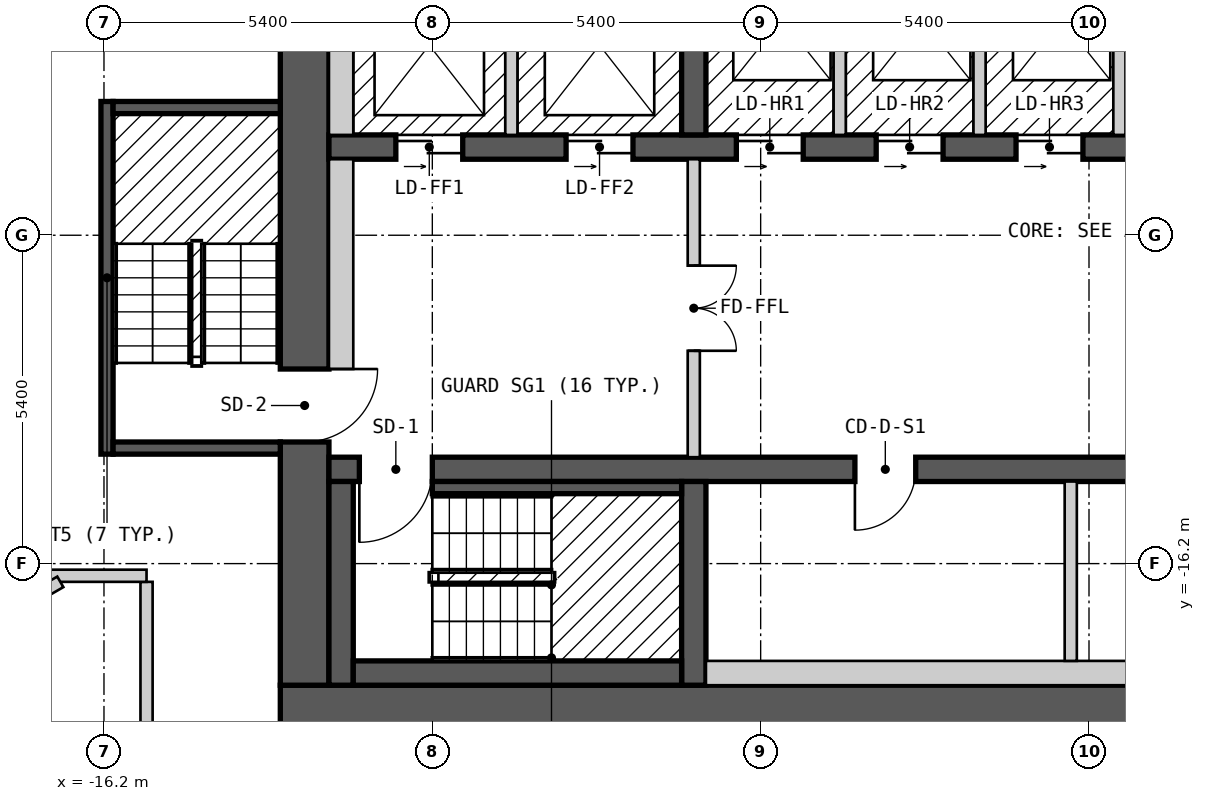
"""IFC4 building model, lengths in metres.
Left out: names, types, materials, properties, quantities, classifications, styles, units other than length and angle.
Written with IfcOpenShell. Run it as: python <this file> out.ifc"""

import sys

from ifc_helpers import new_model, si_unit, direction, frame, frame_2d, origin, place, context, subcontext, project, spatial, polyline, rectangle, outline, extrude, element, fill, save


model = new_model("IFC4")
c1 = context("Model", 3, precision=1e-05, world=origin(), true_north=direction((0.0, 1.0)))
c2 = subcontext(c1, "Body", "Model", "MODEL_VIEW")
j1 = project(units=[si_unit("LENGTHUNIT", "METRE"), si_unit("PLANEANGLEUNIT", "RADIAN")], contexts=[c1])
p1 = place(None, origin())
s1 = spatial("IfcSite", under=j1, at=p1, CompositionType="ELEMENT")
p2 = place(p1, origin())
s2 = spatial("IfcBuilding", under=s1, at=p2, CompositionType="ELEMENT")
p3 = place(p2, frame((0.0, 0.0, 150.6)))
s3 = spatial("IfcBuildingStorey", under=s2, at=p3, CompositionType="ELEMENT", Elevation=150.6)
p4 = place(p3, frame((-13.3, -18.6, 0.0), z_axis=(0.0, 0.0, 1.0), x_axis=(1.0, 0.0, 0.0)))
e1 = element("IfcWall", 1, at=p4, inside=s3, PredefinedType="SHEAR", context=c2, shape_type="SweptSolid", body=[
    extrude(rectangle(XDim=26.6, YDim=0.8, at=frame_2d((13.3, 0.0))), origin(), (0.0, 0.0, 1.0), 2.6),
])
p5 = place(p3, frame((-12.9, -18.2, 0.0), z_axis=(0.0, 0.0, 1.0), x_axis=(0.0, 1.0, 0.0)))
e2 = element("IfcWall", 2, at=p5, inside=s3, PredefinedType="SHEAR", context=c2, shape_type="SweptSolid", body=[
    extrude(rectangle(XDim=12.4, YDim=0.8, at=frame_2d((6.2, 0.0))), origin(), (0.0, 0.0, 1.0), 2.6),
])
p6 = place(p5, frame((4.0, 0.0, 0.0)))
e3 = element("IfcOpeningElement", 3, at=p6, cuts=e2, PredefinedType="OPENING", context=c2, shape_type="SweptSolid", body=[
    extrude(rectangle(XDim=1.2, YDim=2.1, at=frame_2d((0.6, 1.05))), frame((0.0, 0.41, 0.0), z_axis=(0.0, -1.0, 0.0), x_axis=(1.0, 0.0, 0.0)), (0.0, 0.0, 1.0), 0.82),
])
p7 = place(p3, frame((-12.5, -14.65, 0.0), z_axis=(0.0, 0.0, 1.0), x_axis=(1.0, 0.0, 0.0)))
e4 = element("IfcWall", 4, at=p7, inside=s3, PredefinedType="SHEAR", context=c2, shape_type="SweptSolid", body=[
    extrude(rectangle(XDim=25.0, YDim=0.4, at=frame_2d((12.5, 0.0))), origin(), (0.0, 0.0, 1.0), 2.6),
])
p8 = place(p7, frame((1.7, 0.0, 0.0), z_axis=(0.0, 0.0, 1.0), x_axis=(-1.0, 0.0, 0.0)))
e5 = element("IfcOpeningElement", 5, at=p8, cuts=e4, PredefinedType="OPENING", context=c2, shape_type="SweptSolid", body=[
    extrude(rectangle(XDim=1.2, YDim=2.1, at=frame_2d((0.6, 1.05))), frame((0.0, 0.21, 0.0), z_axis=(0.0, -1.0, 0.0), x_axis=(1.0, 0.0, 0.0)), (0.0, 0.0, 1.0), 0.42),
])
p9 = place(p7, frame((24.55, 0.0, 0.0), z_axis=(0.0, 0.0, 1.0), x_axis=(-1.0, 0.0, 0.0)))
e6 = element("IfcOpeningElement", 6, at=p9, cuts=e4, PredefinedType="OPENING", context=c2, shape_type="SweptSolid", body=[
    extrude(rectangle(XDim=1.2, YDim=2.1, at=frame_2d((0.6, 1.05))), frame((0.0, 0.21, 0.0), z_axis=(0.0, -1.0, 0.0), x_axis=(1.0, 0.0, 0.0)), (0.0, 0.0, 1.0), 0.42),
])
p10 = place(p7, frame((9.65, 0.0, 0.0), z_axis=(0.0, 0.0, 1.0), x_axis=(-1.0, 0.0, 0.0)))
e7 = element("IfcOpeningElement", 7, at=p10, cuts=e4, PredefinedType="OPENING", context=c2, shape_type="SweptSolid", body=[
    extrude(rectangle(XDim=1.0, YDim=2.1, at=frame_2d((0.5, 1.05))), frame((0.0, 0.21, 0.0), z_axis=(0.0, -1.0, 0.0), x_axis=(1.0, 0.0, 0.0)), (0.0, 0.0, 1.0), 0.42),
])
p11 = place(p7, frame((16.05, 0.0, 0.0), z_axis=(0.0, 0.0, 1.0), x_axis=(-1.0, 0.0, 0.0)))
e8 = element("IfcOpeningElement", 8, at=p11, cuts=e4, PredefinedType="OPENING", context=c2, shape_type="SweptSolid", body=[
    extrude(rectangle(XDim=1.0, YDim=2.1, at=frame_2d((0.5, 1.05))), frame((0.0, 0.21, 0.0), z_axis=(0.0, -1.0, 0.0), x_axis=(1.0, 0.0, 0.0)), (0.0, 0.0, 1.0), 0.42),
])
p12 = place(p3, frame((-12.5, -9.35, 0.0), z_axis=(0.0, 0.0, 1.0), x_axis=(1.0, 0.0, 0.0)))
e9 = element("IfcWall", 9, at=p12, inside=s3, PredefinedType="SHEAR", context=c2, shape_type="SweptSolid", body=[
    extrude(rectangle(XDim=22.7, YDim=0.4, at=frame_2d((11.35, 0.0))), origin(), (0.0, 0.0, 1.0), 2.6),
])
p13 = place(p12, frame((1.1, 0.0, 0.0)))
e10 = element("IfcOpeningElement", 10, at=p13, cuts=e9, PredefinedType="OPENING", context=c2, shape_type="SweptSolid", body=[
    extrude(rectangle(XDim=1.1, YDim=2.1, at=frame_2d((0.55, 1.05))), frame((0.0, 0.21, 0.0), z_axis=(0.0, -1.0, 0.0), x_axis=(1.0, 0.0, 0.0)), (0.0, 0.0, 1.0), 0.42),
])
p14 = place(p12, frame((3.9, 0.0, 0.0)))
e11 = element("IfcOpeningElement", 11, at=p14, cuts=e9, PredefinedType="OPENING", context=c2, shape_type="SweptSolid", body=[
    extrude(rectangle(XDim=1.1, YDim=2.1, at=frame_2d((0.55, 1.05))), frame((0.0, 0.21, 0.0), z_axis=(0.0, -1.0, 0.0), x_axis=(1.0, 0.0, 0.0)), (0.0, 0.0, 1.0), 0.42),
])
p15 = place(p12, frame((6.7, 0.0, 0.0)))
e12 = element("IfcOpeningElement", 12, at=p15, cuts=e9, PredefinedType="OPENING", context=c2, shape_type="SweptSolid", body=[
    extrude(rectangle(XDim=1.1, YDim=2.1, at=frame_2d((0.55, 1.05))), frame((0.0, 0.21, 0.0), z_axis=(0.0, -1.0, 0.0), x_axis=(1.0, 0.0, 0.0)), (0.0, 0.0, 1.0), 0.42),
])
p16 = place(p12, frame((9.0, 0.0, 0.0)))
e13 = element("IfcOpeningElement", 13, at=p16, cuts=e9, PredefinedType="OPENING", context=c2, shape_type="SweptSolid", body=[
    extrude(rectangle(XDim=1.1, YDim=2.1, at=frame_2d((0.55, 1.05))), frame((0.0, 0.21, 0.0), z_axis=(0.0, -1.0, 0.0), x_axis=(1.0, 0.0, 0.0)), (0.0, 0.0, 1.0), 0.42),
])
p17 = place(p12, frame((11.3, 0.0, 0.0)))
e14 = element("IfcOpeningElement", 14, at=p17, cuts=e9, PredefinedType="OPENING", context=c2, shape_type="SweptSolid", body=[
    extrude(rectangle(XDim=1.1, YDim=2.1, at=frame_2d((0.55, 1.05))), frame((0.0, 0.21, 0.0), z_axis=(0.0, -1.0, 0.0), x_axis=(1.0, 0.0, 0.0)), (0.0, 0.0, 1.0), 0.42),
])
p18 = place(p12, frame((13.6, 0.0, 0.0)))
e15 = element("IfcOpeningElement", 15, at=p18, cuts=e9, PredefinedType="OPENING", context=c2, shape_type="SweptSolid", body=[
    extrude(rectangle(XDim=1.1, YDim=2.1, at=frame_2d((0.55, 1.05))), frame((0.0, 0.21, 0.0), z_axis=(0.0, -1.0, 0.0), x_axis=(1.0, 0.0, 0.0)), (0.0, 0.0, 1.0), 0.42),
])
p19 = place(p12, frame((15.9, 0.0, 0.0)))
e16 = element("IfcOpeningElement", 16, at=p19, cuts=e9, PredefinedType="OPENING", context=c2, shape_type="SweptSolid", body=[
    extrude(rectangle(XDim=1.1, YDim=2.1, at=frame_2d((0.55, 1.05))), frame((0.0, 0.21, 0.0), z_axis=(0.0, -1.0, 0.0), x_axis=(1.0, 0.0, 0.0)), (0.0, 0.0, 1.0), 0.42),
])
p20 = place(p12, frame((18.2, 0.0, 0.0)))
e17 = element("IfcOpeningElement", 17, at=p20, cuts=e9, PredefinedType="OPENING", context=c2, shape_type="SweptSolid", body=[
    extrude(rectangle(XDim=1.1, YDim=2.1, at=frame_2d((0.55, 1.05))), frame((0.0, 0.21, 0.0), z_axis=(0.0, -1.0, 0.0), x_axis=(1.0, 0.0, 0.0)), (0.0, 0.0, 1.0), 0.42),
])
p21 = place(p12, frame((20.6, 0.0, 0.0)))
e18 = element("IfcOpeningElement", 18, at=p21, cuts=e9, PredefinedType="OPENING", context=c2, shape_type="SweptSolid", body=[
    extrude(rectangle(XDim=1.1, YDim=2.1, at=frame_2d((0.55, 1.05))), frame((0.0, 0.21, 0.0), z_axis=(0.0, -1.0, 0.0), x_axis=(1.0, 0.0, 0.0)), (0.0, 0.0, 1.0), 0.42),
])
for number, where, z_axis, x_axis in (
    (19, (-6.5, -18.2, 0.0), (0.0, 0.0, 1.0), (0.0, 1.0, 0.0)),
    (20, (-6.5, -9.15, 0.0), (0.0, 0.0, 1.0), (0.0, 1.0, 0.0)),
):
    element("IfcWall", number, at=place(p3, frame(where, z_axis=z_axis, x_axis=x_axis)), inside=s3, PredefinedType="SHEAR", context=c2, shape_type="SweptSolid", body=[
        extrude(rectangle(XDim=3.35, YDim=0.4, at=frame_2d((1.675, 0.0))), origin(), (0.0, 0.0, 1.0), 2.6),
    ])
p22 = place(p3, frame((-28.218, -2.025, 0.0), z_axis=(0.0, 0.0, 1.0), x_axis=(0.500017503135, -0.866015298109, 0.0)))
e21 = element("IfcWall", 21, at=p22, inside=s3, PredefinedType="SOLIDWALL", context=c2, shape_type="SweptSolid", body=[
    extrude(outline(polyline([(0.0, -0.15), (24.711, -0.15), (24.631, 0.15), (0.08, 0.15), (0.0, -0.15)])), origin(), (0.0, 0.0, 1.0), 2.6),
])
p23 = place(p22, frame((1.4, 0.0, 0.15)))
e22 = element("IfcOpeningElement", 22, at=p23, cuts=e21, PredefinedType="OPENING", context=c2, shape_type="SweptSolid", body=[
    extrude(rectangle(XDim=1.5, YDim=2.1, at=frame_2d((0.75, 1.05))), frame((0.0, 0.16, 0.0), z_axis=(0.0, -1.0, 0.0), x_axis=(1.0, 0.0, 0.0)), (0.0, 0.0, 1.0), 0.32),
])
p24 = place(p22, frame((4.316, 0.0, 0.15)))
e23 = element("IfcOpeningElement", 23, at=p24, cuts=e21, PredefinedType="OPENING", context=c2, shape_type="SweptSolid", body=[
    extrude(rectangle(XDim=1.5, YDim=2.1, at=frame_2d((0.75, 1.05))), frame((0.0, 0.16, 0.0), z_axis=(0.0, -1.0, 0.0), x_axis=(1.0, 0.0, 0.0)), (0.0, 0.0, 1.0), 0.32),
])
p25 = place(p22, frame((7.231, 0.0, 0.15)))
e24 = element("IfcOpeningElement", 24, at=p25, cuts=e21, PredefinedType="OPENING", context=c2, shape_type="SweptSolid", body=[
    extrude(rectangle(XDim=1.5, YDim=2.1, at=frame_2d((0.75, 1.05))), frame((0.0, 0.16, 0.0), z_axis=(0.0, -1.0, 0.0), x_axis=(1.0, 0.0, 0.0)), (0.0, 0.0, 1.0), 0.32),
])
p26 = place(p22, frame((10.147, 0.0, 0.15)))
e25 = element("IfcOpeningElement", 25, at=p26, cuts=e21, PredefinedType="OPENING", context=c2, shape_type="SweptSolid", body=[
    extrude(rectangle(XDim=1.5, YDim=2.1, at=frame_2d((0.75, 1.05))), frame((0.0, 0.16, 0.0), z_axis=(0.0, -1.0, 0.0), x_axis=(1.0, 0.0, 0.0)), (0.0, 0.0, 1.0), 0.32),
])
p27 = place(p22, frame((13.062, 0.0, 0.15)))
e26 = element("IfcOpeningElement", 26, at=p27, cuts=e21, PredefinedType="OPENING", context=c2, shape_type="SweptSolid", body=[
    extrude(rectangle(XDim=1.5, YDim=2.1, at=frame_2d((0.75, 1.05))), frame((0.0, 0.16, 0.0), z_axis=(0.0, -1.0, 0.0), x_axis=(1.0, 0.0, 0.0)), (0.0, 0.0, 1.0), 0.32),
])
p28 = place(p22, frame((15.977, 0.0, 0.15)))
e27 = element("IfcOpeningElement", 27, at=p28, cuts=e21, PredefinedType="OPENING", context=c2, shape_type="SweptSolid", body=[
    extrude(rectangle(XDim=1.5, YDim=2.1, at=frame_2d((0.75, 1.05))), frame((0.0, 0.16, 0.0), z_axis=(0.0, -1.0, 0.0), x_axis=(1.0, 0.0, 0.0)), (0.0, 0.0, 1.0), 0.32),
])
p29 = place(p22, frame((18.893, 0.0, 0.15)))
e28 = element("IfcOpeningElement", 28, at=p29, cuts=e21, PredefinedType="OPENING", context=c2, shape_type="SweptSolid", body=[
    extrude(rectangle(XDim=1.5, YDim=2.1, at=frame_2d((0.75, 1.05))), frame((0.0, 0.16, 0.0), z_axis=(0.0, -1.0, 0.0), x_axis=(1.0, 0.0, 0.0)), (0.0, 0.0, 1.0), 0.32),
])
p30 = place(p22, frame((21.809, 0.0, 0.15)))
e29 = element("IfcOpeningElement", 29, at=p30, cuts=e21, PredefinedType="OPENING", context=c2, shape_type="SweptSolid", body=[
    extrude(rectangle(XDim=1.5, YDim=2.1, at=frame_2d((0.75, 1.05))), frame((0.0, 0.16, 0.0), z_axis=(0.0, -1.0, 0.0), x_axis=(1.0, 0.0, 0.0)), (0.0, 0.0, 1.0), 0.32),
])
p31 = place(p3, frame((-15.5, -16.5, 0.0), z_axis=(0.0, 0.0, 1.0), x_axis=(0.0, -1.0, 0.0)))
e30 = element("IfcWall", 30, at=p31, inside=s3, PredefinedType="PARTITIONING", context=c2, shape_type="SweptSolid", body=[
    extrude(rectangle(XDim=4.599, YDim=0.2, at=frame_2d((2.3, 0.0))), origin(), (0.0, 0.0, 1.0), 2.6),
])
p32 = place(p3, frame((-18.249, -16.4, 0.0), z_axis=(0.0, 0.0, 1.0), x_axis=(1.0, 0.0, 0.0)))
e31 = element("IfcWall", 31, at=p32, inside=s3, PredefinedType="PARTITIONING", context=c2, shape_type="SweptSolid", body=[
    extrude(rectangle(XDim=2.749, YDim=0.2, at=frame_2d((1.375, 0.0))), origin(), (0.0, 0.0, 1.0), 2.6),
])
p33 = place(p3, frame((-18.995, -17.699, 0.0), z_axis=(0.0, 0.0, 1.0), x_axis=(0.86607371389, 0.499916315105, 0.0)))
e32 = element("IfcWall", 32, at=p33, inside=s3, PredefinedType="PARTITIONING", context=c2, shape_type="SweptSolid", body=[
    extrude(rectangle(XDim=2.398, YDim=0.2, at=frame_2d((1.199, 0.0))), origin(), (0.0, 0.0, 1.0), 2.6),
])
p34 = place(p3, frame((-16.15, -14.4, 0.0), z_axis=(0.0, 0.0, 1.0), x_axis=(0.0, 1.0, 0.0)))
e33 = element("IfcWall", 33, at=p34, inside=s3, PredefinedType="SOLIDWALL", context=c2, shape_type="SweptSolid", body=[
    extrude(rectangle(XDim=5.8, YDim=0.2, at=frame_2d((2.9, 0.0))), origin(), (0.0, 0.0, 1.0), 2.6),
])
for number, where, z_axis, x_axis in (
    (34, (-16.05, -14.3, 0.0), (0.0, 0.0, 1.0), (1.0, 0.0, 0.0)),
    (35, (-16.05, -8.7, 0.0), (0.0, 0.0, 1.0), (1.0, 0.0, 0.0)),
):
    element("IfcWall", number, at=place(p3, frame(where, z_axis=z_axis, x_axis=x_axis)), inside=s3, PredefinedType="SOLIDWALL", context=c2, shape_type="SweptSolid", body=[
        extrude(rectangle(XDim=2.75, YDim=0.2, at=frame_2d((1.375, 0.0))), origin(), (0.0, 0.0, 1.0), 2.6),
    ])
p35 = place(p3, frame((-12.3, -18.2, 0.0), z_axis=(0.0, 0.0, 1.0), x_axis=(0.0, 1.0, 0.0)))
e36 = element("IfcWall", 36, at=p35, inside=s3, PredefinedType="SOLIDWALL", context=c2, shape_type="SweptSolid", body=[
    extrude(rectangle(XDim=3.35, YDim=0.4, at=frame_2d((1.675, 0.0))), origin(), (0.0, 0.0, 1.0), 2.6),
])
p36 = place(p3, frame((-12.3, -13.0, 0.0), z_axis=(0.0, 0.0, 1.0), x_axis=(0.0, 1.0, 0.0)))
e37 = element("IfcWall", 37, at=p36, inside=s3, PredefinedType="PARTITIONING", context=c2, shape_type="SweptSolid", body=[
    extrude(rectangle(XDim=3.45, YDim=0.4, at=frame_2d((1.725, 0.0))), origin(), (0.0, 0.0, 1.0), 2.6),
])
p37 = place(p3, frame((-12.3, -9.15, 0.0), z_axis=(0.0, 0.0, 1.0), x_axis=(0.0, 1.0, 0.0)))
e38 = element("IfcWall", 38, at=p37, inside=s3, PredefinedType="SOLIDWALL", context=c2, shape_type="SweptSolid", body=[
    extrude(rectangle(XDim=3.35, YDim=0.4, at=frame_2d((1.675, 0.0))), origin(), (0.0, 0.0, 1.0), 2.6),
])
p38 = place(p3, frame((-12.1, -18.0, 0.0), z_axis=(0.0, 0.0, 1.0), x_axis=(1.0, 0.0, 0.0)))
e39 = element("IfcWall", 39, at=p38, inside=s3, PredefinedType="SOLIDWALL", context=c2, shape_type="SweptSolid", body=[
    extrude(rectangle(XDim=5.4, YDim=0.4, at=frame_2d((2.7, 0.0))), origin(), (0.0, 0.0, 1.0), 2.6),
])
p39 = place(p3, frame((-10.8, -14.95, 0.0), z_axis=(0.0, 0.0, 1.0), x_axis=(1.0, 0.0, 0.0)))
e40 = element("IfcWall", 40, at=p39, inside=s3, PredefinedType="SOLIDWALL", context=c2, shape_type="SweptSolid", body=[
    extrude(rectangle(XDim=4.1, YDim=0.2, at=frame_2d((2.05, 0.0))), origin(), (0.0, 0.0, 1.0), 2.6),
])
p40 = place(p3, frame((-9.5, -9.15, 0.0), z_axis=(0.0, 0.0, 1.0), x_axis=(0.0, 1.0, 0.0)))
e41 = element("IfcWall", 41, at=p40, inside=s3, PredefinedType="SOLIDWALL", context=c2, shape_type="SweptSolid", body=[
    extrude(rectangle(XDim=2.95, YDim=0.2, at=frame_2d((1.475, 0.0))), origin(), (0.0, 0.0, 1.0), 2.6),
])
p41 = place(p3, frame((-6.5, -14.45, 0.0), z_axis=(0.0, 0.0, 1.0), x_axis=(0.0, 1.0, 0.0)))
e42 = element("IfcWall", 42, at=p41, inside=s3, PredefinedType="PARTITIONING", context=c2, shape_type="SweptSolid", body=[
    extrude(rectangle(XDim=4.9, YDim=0.2, at=frame_2d((2.45, 0.0))), origin(), (0.0, 0.0, 1.0), 2.6),
])
p42 = place(p41, frame((3.15, 0.0, 0.0), z_axis=(0.0, 0.0, 1.0), x_axis=(-1.0, 0.0, 0.0)))
e43 = element("IfcOpeningElement", 43, at=p42, cuts=e42, PredefinedType="OPENING", context=c2, shape_type="SweptSolid", body=[
    extrude(rectangle(XDim=1.4, YDim=2.1, at=frame_2d((0.7, 1.05))), frame((0.0, 0.11, 0.0), z_axis=(0.0, -1.0, 0.0), x_axis=(1.0, 0.0, 0.0)), (0.0, 0.0, 1.0), 0.22),
])
p43 = place(p3, frame((-6.3, -18.0, 0.0), z_axis=(0.0, 0.0, 1.0), x_axis=(1.0, 0.0, 0.0)))
e44 = element("IfcWall", 44, at=p43, inside=s3, PredefinedType="PARTITIONING", context=c2, shape_type="SweptSolid", body=[
    extrude(rectangle(XDim=12.6, YDim=0.4, at=frame_2d((6.3, 0.0))), origin(), (0.0, 0.0, 1.0), 2.6),
])
for number, where, z_axis, x_axis in (
    (45, (-4.1, -9.15, 0.0), (0.0, 0.0, 1.0), (0.0, 1.0, 0.0)),
    (46, (-1.8, -9.15, 0.0), (0.0, 0.0, 1.0), (0.0, 1.0, 0.0)),
):
    element("IfcWall", number, at=place(p3, frame(where, z_axis=z_axis, x_axis=x_axis)), inside=s3, PredefinedType="SOLIDWALL", context=c2, shape_type="SweptSolid", body=[
        extrude(rectangle(XDim=2.95, YDim=0.2, at=frame_2d((1.475, 0.0))), origin(), (0.0, 0.0, 1.0), 2.6),
    ])
p44 = place(p3, frame((-0.3, -17.8, 0.0), z_axis=(0.0, 0.0, 1.0), x_axis=(0.0, 1.0, 0.0)))
e47 = element("IfcWall", 47, at=p44, inside=s3, PredefinedType="PARTITIONING", context=c2, shape_type="SweptSolid", body=[
    extrude(rectangle(XDim=2.95, YDim=0.2, at=frame_2d((1.475, 0.0))), origin(), (0.0, 0.0, 1.0), 2.6),
])
p45 = place(p3, frame((0.5, -9.15, 0.0), z_axis=(0.0, 0.0, 1.0), x_axis=(0.0, 1.0, 0.0)))
e48 = element("IfcWall", 48, at=p45, inside=s3, PredefinedType="SOLIDWALL", context=c2, shape_type="SweptSolid", body=[
    extrude(rectangle(XDim=2.95, YDim=0.2, at=frame_2d((1.475, 0.0))), origin(), (0.0, 0.0, 1.0), 2.6),
])
p46 = place(p13, origin())
e49 = element("IfcDoor", 49, at=p46, inside=s3, OperationType="DOUBLE_DOOR_SLIDING", PredefinedType="DOOR", context=c2, shape_type="SweptSolid", body=[
    extrude(rectangle(XDim=1.1, YDim=2.1, at=frame_2d((0.55, 1.05))), frame((0.0, 0.025, 0.0), z_axis=(0.0, -1.0, 0.0), x_axis=(1.0, 0.0, 0.0)), (0.0, 0.0, 1.0), 0.05),
])
fill(e10, e49)
p47 = place(p14, origin())
e50 = element("IfcDoor", 50, at=p47, inside=s3, OperationType="DOUBLE_DOOR_SLIDING", PredefinedType="DOOR", context=c2, shape_type="SweptSolid", body=[
    extrude(rectangle(XDim=1.1, YDim=2.1, at=frame_2d((0.55, 1.05))), frame((0.0, 0.025, 0.0), z_axis=(0.0, -1.0, 0.0), x_axis=(1.0, 0.0, 0.0)), (0.0, 0.0, 1.0), 0.05),
])
fill(e11, e50)
p48 = place(p15, origin())
e51 = element("IfcDoor", 51, at=p48, inside=s3, OperationType="DOUBLE_DOOR_SLIDING", PredefinedType="DOOR", context=c2, shape_type="SweptSolid", body=[
    extrude(rectangle(XDim=1.1, YDim=2.1, at=frame_2d((0.55, 1.05))), frame((0.0, 0.025, 0.0), z_axis=(0.0, -1.0, 0.0), x_axis=(1.0, 0.0, 0.0)), (0.0, 0.0, 1.0), 0.05),
])
fill(e12, e51)
p49 = place(p16, origin())
e52 = element("IfcDoor", 52, at=p49, inside=s3, OperationType="DOUBLE_DOOR_SLIDING", PredefinedType="DOOR", context=c2, shape_type="SweptSolid", body=[
    extrude(rectangle(XDim=1.1, YDim=2.1, at=frame_2d((0.55, 1.05))), frame((0.0, 0.025, 0.0), z_axis=(0.0, -1.0, 0.0), x_axis=(1.0, 0.0, 0.0)), (0.0, 0.0, 1.0), 0.05),
])
fill(e13, e52)
p50 = place(p17, origin())
e53 = element("IfcDoor", 53, at=p50, inside=s3, OperationType="DOUBLE_DOOR_SLIDING", PredefinedType="DOOR", context=c2, shape_type="SweptSolid", body=[
    extrude(rectangle(XDim=1.1, YDim=2.1, at=frame_2d((0.55, 1.05))), frame((0.0, 0.025, 0.0), z_axis=(0.0, -1.0, 0.0), x_axis=(1.0, 0.0, 0.0)), (0.0, 0.0, 1.0), 0.05),
])
fill(e14, e53)
p51 = place(p8, origin())
e54 = element("IfcDoor", 54, at=p51, inside=s3, OperationType="SINGLE_SWING_RIGHT", PredefinedType="DOOR", context=c2, shape_type="SweptSolid", body=[
    extrude(rectangle(XDim=1.2, YDim=2.1, at=frame_2d((0.6, 1.05))), frame((0.0, 0.025, 0.0), z_axis=(0.0, -1.0, 0.0), x_axis=(1.0, 0.0, 0.0)), (0.0, 0.0, 1.0), 0.05),
])
fill(e5, e54)
p52 = place(p6, origin())
e55 = element("IfcDoor", 55, at=p52, inside=s3, OperationType="SINGLE_SWING_RIGHT", PredefinedType="DOOR", context=c2, shape_type="SweptSolid", body=[
    extrude(rectangle(XDim=1.2, YDim=2.1, at=frame_2d((0.6, 1.05))), frame((0.0, 0.025, 0.0), z_axis=(0.0, -1.0, 0.0), x_axis=(1.0, 0.0, 0.0)), (0.0, 0.0, 1.0), 0.05),
])
fill(e3, e55)
p53 = place(p42, origin())
e56 = element("IfcDoor", 56, at=p53, inside=s3, OperationType="DOUBLE_DOOR_SINGLE_SWING", PredefinedType="DOOR", context=c2, shape_type="SweptSolid", body=[
    extrude(rectangle(XDim=1.4, YDim=2.1, at=frame_2d((0.7, 1.05))), frame((0.0, 0.025, 0.0), z_axis=(0.0, -1.0, 0.0), x_axis=(1.0, 0.0, 0.0)), (0.0, 0.0, 1.0), 0.05),
])
fill(e43, e56)
p54 = place(p10, origin())
e57 = element("IfcDoor", 57, at=p54, inside=s3, OperationType="SINGLE_SWING_RIGHT", PredefinedType="DOOR", context=c2, shape_type="SweptSolid", body=[
    extrude(rectangle(XDim=1.0, YDim=2.1, at=frame_2d((0.5, 1.05))), frame((0.0, 0.025, 0.0), z_axis=(0.0, -1.0, 0.0), x_axis=(1.0, 0.0, 0.0)), (0.0, 0.0, 1.0), 0.05),
])
fill(e7, e57)
save(model, sys.argv[1])
